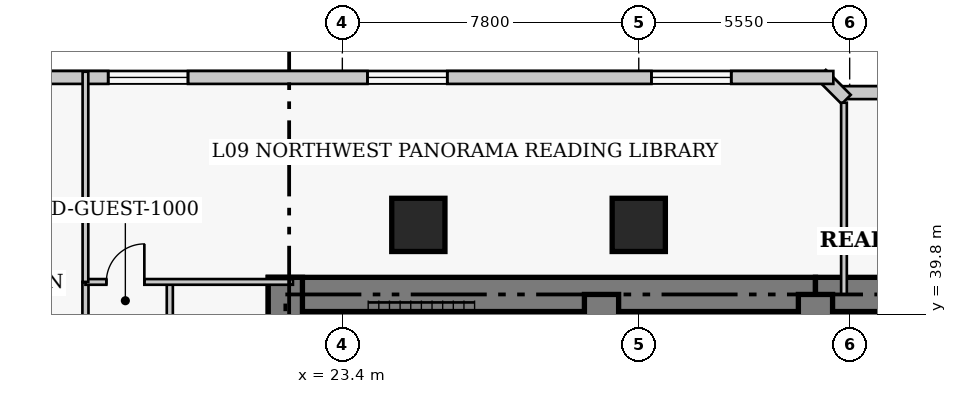
"""IFC4 building model, lengths in metres.
Left out: names, types, materials, properties, quantities, classifications, styles, units other than length and angle.
Written with IfcOpenShell. Run it as: python <this file> out.ifc"""

import sys

from ifc_helpers import new_model, si_unit, direction, frame, frame_2d, origin, origin_2d, place, context, subcontext, project, spatial, rectangle, extrude, element, fill, save


model = new_model("IFC4")
c1 = context("Model", 3, precision=1e-05, world=origin(), true_north=direction((0.0, 1.0)))
c2 = subcontext(c1, "Body", "Model", "MODEL_VIEW")
j1 = project(units=[si_unit("LENGTHUNIT", "METRE"), si_unit("PLANEANGLEUNIT", "RADIAN")], contexts=[c1])
p1 = place(None, origin())
s1 = spatial("IfcSite", under=j1, at=p1, CompositionType="ELEMENT")
p2 = place(p1, origin())
s2 = spatial("IfcBuilding", under=s1, at=p2, CompositionType="ELEMENT")
p3 = place(p2, frame((0.0, 0.0, 41.2)))
s3 = spatial("IfcBuildingStorey", under=s2, at=p3, CompositionType="ELEMENT", Elevation=41.2)
p4 = place(p3, frame((21.45, 40.32, 0.0), z_axis=(0.0, 0.0, 1.0), x_axis=(1.0, 0.0, 0.0)))
e1 = element("IfcWall", 1, at=p4, inside=s3, PredefinedType="SHEAR", context=c2, shape_type="SweptSolid", body=[
    extrude(rectangle(XDim=14.4, YDim=0.9, at=frame_2d((7.2, 0.0))), origin(), (0.0, 0.0, 1.0), 3.8),
])
p5 = place(p3, frame((35.85, 40.32, 0.0), z_axis=(0.0, 0.0, 1.0), x_axis=(1.0, 0.0, 0.0)))
e2 = element("IfcWall", 2, at=p5, inside=s3, PredefinedType="SHEAR", context=c2, shape_type="SweptSolid", body=[
    extrude(rectangle(XDim=12.6, YDim=0.9, at=frame_2d((6.3, 0.0))), origin(), (0.0, 0.0, 1.0), 3.8),
])
p6 = place(p3, frame((21.9, 27.05, 0.0), z_axis=(0.0, 0.0, 1.0), x_axis=(0.0, 1.0, 0.0)))
e3 = element("IfcWall", 3, at=p6, inside=s3, PredefinedType="SHEAR", context=c2, shape_type="SweptSolid", body=[
    extrude(rectangle(XDim=13.72, YDim=0.9, at=frame_2d((6.86, 0.0))), origin(), (0.0, 0.0, 1.0), 3.8),
])
p7 = place(p3, frame((30.22, 33.2, 0.0), z_axis=(0.0, 0.0, 1.0), x_axis=(0.0, 1.0, 0.0)))
e4 = element("IfcWall", 4, at=p7, inside=s3, PredefinedType="SHEAR", context=c2, shape_type="SweptSolid", body=[
    extrude(rectangle(XDim=7.12, YDim=0.9, at=frame_2d((3.56, 0.0))), origin(), (0.0, 0.0, 1.0), 3.8),
])
p8 = place(p3, frame((35.85, 36.37, 0.0), z_axis=(0.0, 0.0, 1.0), x_axis=(0.0, 1.0, 0.0)))
e5 = element("IfcWall", 5, at=p8, inside=s3, PredefinedType="SHEAR", context=c2, shape_type="SweptSolid", body=[
    extrude(rectangle(XDim=3.95, YDim=0.9, at=frame_2d((1.975, 0.0))), origin(), (0.0, 0.0, 1.0), 3.8),
])
p9 = place(p8, frame((0.88, 0.0, 0.0)))
e6 = element("IfcOpeningElement", 6, at=p9, cuts=e5, PredefinedType="OPENING", context=c2, shape_type="SweptSolid", body=[
    extrude(rectangle(XDim=1.1, YDim=2.15, at=frame_2d((0.55, 1.075))), frame((0.0, 0.46, 0.0), z_axis=(0.0, -1.0, 0.0), x_axis=(1.0, 0.0, 0.0)), (0.0, 0.0, 1.0), 0.92),
])
for number, where, z_axis, x_axis in (
    (7, (25.4, 42.15, 0.0), (0.0, 0.0, 1.0), (1.0, 0.0, 0.0)),
    (8, (31.2, 42.15, 0.0), (0.0, 0.0, 1.0), (1.0, 0.0, 0.0)),
):
    element("IfcColumn", number, at=place(p3, frame(where, z_axis=z_axis, x_axis=x_axis)), inside=s3, PredefinedType="COLUMN", context=c2, shape_type="SweptSolid", body=[
        extrude(rectangle(XDim=1.4, YDim=1.4, at=origin_2d()), origin(), (0.0, 0.0, 1.0), 3.8),
    ])
p10 = place(p3, frame((41.42, 45.63, 0.0), z_axis=(0.0, 0.0, 1.0), x_axis=(-1.0, 0.0, 0.0)))
e9 = element("IfcWall", 9, at=p10, inside=s3, PredefinedType="SOLIDWALL", context=c2, shape_type="SweptSolid", body=[
    extrude(rectangle(XDim=4.84, YDim=0.34, at=frame_2d((2.42, 0.0))), origin(), (0.0, 0.0, 1.0), 3.54),
])
p11 = place(p10, frame((1.37, 0.0, 0.85)))
e10 = element("IfcOpeningElement", 10, at=p11, cuts=e9, PredefinedType="OPENING", context=c2, shape_type="SweptSolid", body=[
    extrude(rectangle(XDim=2.1, YDim=1.85, at=frame_2d((1.05, 0.925))), frame((0.0, 0.18, 0.0), z_axis=(0.0, -1.0, 0.0), x_axis=(1.0, 0.0, 0.0)), (0.0, 0.0, 1.0), 0.36),
])
p12 = place(p3, frame((36.658, 45.451, 0.0), z_axis=(0.0, 0.0, 1.0), x_axis=(-0.707106781187, 0.707106781187, 0.0)))
e11 = element("IfcWall", 11, at=p12, inside=s3, PredefinedType="SOLIDWALL", context=c2, shape_type="SweptSolid", body=[
    extrude(rectangle(XDim=0.929, YDim=0.34, at=frame_2d((0.464, 0.0))), origin(), (0.0, 0.0, 1.0), 3.54),
])
p13 = place(p3, frame((36.32, 46.03, 0.0), z_axis=(0.0, 0.0, 1.0), x_axis=(-1.0, 0.0, 0.0)))
e12 = element("IfcWall", 12, at=p13, inside=s3, PredefinedType="SOLIDWALL", context=c2, shape_type="SweptSolid", body=[
    extrude(rectangle(XDim=29.89, YDim=0.34, at=frame_2d((14.945, 0.0))), origin(), (0.0, 0.0, 1.0), 3.54),
])
p14 = place(p13, frame((2.686, 0.0, 0.85)))
e13 = element("IfcOpeningElement", 13, at=p14, cuts=e12, PredefinedType="OPENING", context=c2, shape_type="SweptSolid", body=[
    extrude(rectangle(XDim=2.1, YDim=1.85, at=frame_2d((1.05, 0.925))), frame((0.0, 0.18, 0.0), z_axis=(0.0, -1.0, 0.0), x_axis=(1.0, 0.0, 0.0)), (0.0, 0.0, 1.0), 0.36),
])
p15 = place(p13, frame((10.159, 0.0, 0.85)))
e14 = element("IfcOpeningElement", 14, at=p15, cuts=e12, PredefinedType="OPENING", context=c2, shape_type="SweptSolid", body=[
    extrude(rectangle(XDim=2.1, YDim=1.85, at=frame_2d((1.05, 0.925))), frame((0.0, 0.18, 0.0), z_axis=(0.0, -1.0, 0.0), x_axis=(1.0, 0.0, 0.0)), (0.0, 0.0, 1.0), 0.36),
])
p16 = place(p13, frame((16.981, 0.0, 0.85)))
e15 = element("IfcOpeningElement", 15, at=p16, cuts=e12, PredefinedType="OPENING", context=c2, shape_type="SweptSolid", body=[
    extrude(rectangle(XDim=2.1, YDim=1.85, at=frame_2d((1.05, 0.925))), frame((0.0, 0.18, 0.0), z_axis=(0.0, -1.0, 0.0), x_axis=(1.0, 0.0, 0.0)), (0.0, 0.0, 1.0), 0.36),
])
p17 = place(p13, frame((25.104, 0.0, 0.85)))
e16 = element("IfcOpeningElement", 16, at=p17, cuts=e12, PredefinedType="OPENING", context=c2, shape_type="SweptSolid", body=[
    extrude(rectangle(XDim=2.1, YDim=1.85, at=frame_2d((1.05, 0.925))), frame((0.0, 0.18, 0.0), z_axis=(0.0, -1.0, 0.0), x_axis=(1.0, 0.0, 0.0)), (0.0, 0.0, 1.0), 0.36),
])
p18 = place(p3, frame((16.64, 5.05, 0.0), z_axis=(0.0, 0.0, 1.0), x_axis=(0.0, 1.0, 0.0)))
e17 = element("IfcWall", 17, at=p18, inside=s3, PredefinedType="PARTITIONING", context=c2, shape_type="SweptSolid", body=[
    extrude(rectangle(XDim=35.6, YDim=0.16, at=frame_2d((17.8, 0.0))), origin(), (0.0, 0.0, 1.0), 3.54),
])
p19 = place(p18, frame((2.6, 0.0, 0.0)))
e18 = element("IfcOpeningElement", 18, at=p19, cuts=e17, PredefinedType="OPENING", context=c2, shape_type="SweptSolid", body=[
    extrude(rectangle(XDim=0.95, YDim=2.1, at=frame_2d((0.475, 1.05))), frame((0.0, 0.09, 0.0), z_axis=(0.0, -1.0, 0.0), x_axis=(1.0, 0.0, 0.0)), (0.0, 0.0, 1.0), 0.18),
])
p20 = place(p18, frame((10.075, 0.0, 0.0)))
e19 = element("IfcOpeningElement", 19, at=p20, cuts=e17, PredefinedType="OPENING", context=c2, shape_type="SweptSolid", body=[
    extrude(rectangle(XDim=0.95, YDim=2.1, at=frame_2d((0.475, 1.05))), frame((0.0, 0.09, 0.0), z_axis=(0.0, -1.0, 0.0), x_axis=(1.0, 0.0, 0.0)), (0.0, 0.0, 1.0), 0.18),
])
p21 = place(p18, frame((18.875, 0.0, 0.0)))
e20 = element("IfcOpeningElement", 20, at=p21, cuts=e17, PredefinedType="OPENING", context=c2, shape_type="SweptSolid", body=[
    extrude(rectangle(XDim=0.95, YDim=2.1, at=frame_2d((0.475, 1.05))), frame((0.0, 0.09, 0.0), z_axis=(0.0, -1.0, 0.0), x_axis=(1.0, 0.0, 0.0)), (0.0, 0.0, 1.0), 0.18),
])
p22 = place(p18, frame((26.575, 0.0, 0.0)))
e21 = element("IfcOpeningElement", 21, at=p22, cuts=e17, PredefinedType="OPENING", context=c2, shape_type="SweptSolid", body=[
    extrude(rectangle(XDim=0.95, YDim=2.1, at=frame_2d((0.475, 1.05))), frame((0.0, 0.09, 0.0), z_axis=(0.0, -1.0, 0.0), x_axis=(1.0, 0.0, 0.0)), (0.0, 0.0, 1.0), 0.18),
])
p23 = place(p18, frame((30.9, 0.0, 0.0)))
e22 = element("IfcOpeningElement", 22, at=p23, cuts=e17, PredefinedType="OPENING", context=c2, shape_type="SweptSolid", body=[
    extrude(rectangle(XDim=1.0, YDim=2.15, at=frame_2d((0.5, 1.075))), frame((0.0, 0.09, 0.0), z_axis=(0.0, -1.0, 0.0), x_axis=(1.0, 0.0, 0.0)), (0.0, 0.0, 1.0), 0.18),
])
p24 = place(p3, frame((18.86, 35.02, 0.0), z_axis=(0.0, 0.0, 1.0), x_axis=(0.0, 1.0, 0.0)))
e23 = element("IfcWall", 23, at=p24, inside=s3, PredefinedType="PARTITIONING", context=c2, shape_type="SweptSolid", body=[
    extrude(rectangle(XDim=5.63, YDim=0.16, at=frame_2d((2.815, 0.0))), origin(), (0.0, 0.0, 1.0), 3.54),
])
p25 = place(p3, frame((16.64, 40.65, 0.0), z_axis=(0.0, 0.0, 1.0), x_axis=(1.0, 0.0, 0.0)))
e24 = element("IfcWall", 24, at=p25, inside=s3, PredefinedType="PARTITIONING", context=c2, shape_type="SweptSolid", body=[
    extrude(rectangle(XDim=5.46, YDim=0.15, at=frame_2d((2.73, 0.0))), origin(), (0.0, 0.0, 1.0), 3.54),
])
p26 = place(p25, frame((0.55, 0.0, 0.0)))
e25 = element("IfcOpeningElement", 25, at=p26, cuts=e24, PredefinedType="OPENING", context=c2, shape_type="SweptSolid", body=[
    extrude(rectangle(XDim=1.0, YDim=2.15, at=frame_2d((0.5, 1.075))), frame((0.0, 0.085, 0.0), z_axis=(0.0, -1.0, 0.0), x_axis=(1.0, 0.0, 0.0)), (0.0, 0.0, 1.0), 0.17),
])
p27 = place(p3, frame((16.64, 40.65, 0.0), z_axis=(0.0, 0.0, 1.0), x_axis=(0.0, 1.0, 0.0)))
e26 = element("IfcWall", 26, at=p27, inside=s3, PredefinedType="PARTITIONING", context=c2, shape_type="SweptSolid", body=[
    extrude(rectangle(XDim=5.53, YDim=0.15, at=frame_2d((2.765, 0.0))), origin(), (0.0, 0.0, 1.0), 3.54),
])
p28 = place(p3, frame((36.6, 40.32, 0.0), z_axis=(0.0, 0.0, 1.0), x_axis=(0.0, 1.0, 0.0)))
e27 = element("IfcWall", 27, at=p28, inside=s3, PredefinedType="PARTITIONING", context=c2, shape_type="SweptSolid", body=[
    extrude(rectangle(XDim=5.045, YDim=0.15, at=frame_2d((2.522, 0.0))), origin(), (0.0, 0.0, 1.0), 3.54),
])
p29 = place(p14, origin())
e28 = element("IfcWindow", 28, at=p29, inside=s3, PartitioningType="SINGLE_PANEL", PredefinedType="WINDOW", context=c2, shape_type="SweptSolid", body=[
    extrude(rectangle(XDim=2.1, YDim=1.85, at=frame_2d((1.05, 0.925))), frame((0.0, 0.03, 0.0), z_axis=(0.0, -1.0, 0.0), x_axis=(1.0, 0.0, 0.0)), (0.0, 0.0, 1.0), 0.06),
])
fill(e13, e28)
p30 = place(p15, origin())
e29 = element("IfcWindow", 29, at=p30, inside=s3, PartitioningType="SINGLE_PANEL", PredefinedType="WINDOW", context=c2, shape_type="SweptSolid", body=[
    extrude(rectangle(XDim=2.1, YDim=1.85, at=frame_2d((1.05, 0.925))), frame((0.0, 0.03, 0.0), z_axis=(0.0, -1.0, 0.0), x_axis=(1.0, 0.0, 0.0)), (0.0, 0.0, 1.0), 0.06),
])
fill(e14, e29)
p31 = place(p16, origin())
e30 = element("IfcWindow", 30, at=p31, inside=s3, PartitioningType="SINGLE_PANEL", PredefinedType="WINDOW", context=c2, shape_type="SweptSolid", body=[
    extrude(rectangle(XDim=2.1, YDim=1.85, at=frame_2d((1.05, 0.925))), frame((0.0, 0.03, 0.0), z_axis=(0.0, -1.0, 0.0), x_axis=(1.0, 0.0, 0.0)), (0.0, 0.0, 1.0), 0.06),
])
fill(e15, e30)
p32 = place(p26, origin())
e31 = element("IfcDoor", 31, at=p32, inside=s3, OperationType="SINGLE_SWING_RIGHT", PredefinedType="DOOR", context=c2, shape_type="SweptSolid", body=[
    extrude(rectangle(XDim=1.0, YDim=2.15, at=frame_2d((0.5, 1.075))), frame((0.0, 0.025, 0.0), z_axis=(0.0, -1.0, 0.0), x_axis=(1.0, 0.0, 0.0)), (0.0, 0.0, 1.0), 0.05),
])
fill(e25, e31)
save(model, sys.argv[1])
